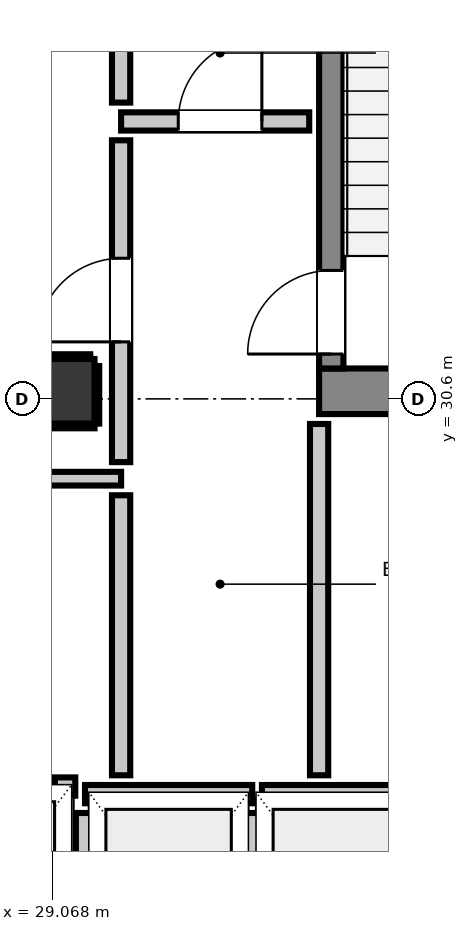
"""IFC4 building model, lengths in metres.
Left out: names, types, materials, properties, quantities, classifications, styles, units other than length and angle.
Written with IfcOpenShell. Run it as: python <this file> out.ifc"""

import sys

from ifc_helpers import new_model, si_unit, direction, frame, frame_2d, origin, origin_2d, place, context, subcontext, project, spatial, rectangle, extrude, element, fill, save


model = new_model("IFC4")
c1 = context("Model", 3, precision=1e-05, world=origin(), true_north=direction((0.0, 1.0)))
c2 = subcontext(c1, "Body", "Model", "MODEL_VIEW")
j1 = project(units=[si_unit("LENGTHUNIT", "METRE"), si_unit("PLANEANGLEUNIT", "RADIAN")], contexts=[c1])
p1 = place(None, origin())
s1 = spatial("IfcSite", under=j1, at=p1, CompositionType="ELEMENT")
p2 = place(p1, origin())
s2 = spatial("IfcBuilding", under=s1, at=p2, CompositionType="ELEMENT")
p3 = place(p2, frame((0.0, 0.0, 220.04)))
s3 = spatial("IfcBuildingStorey", under=s2, at=p3, CompositionType="ELEMENT", Elevation=220.04)
p4 = place(p3, frame((32.58, 30.7, 0.0), z_axis=(0.0, 0.0, 1.0), x_axis=(1.0, 0.0, 0.0)))
e1 = element("IfcWall", 1, at=p4, inside=s3, PredefinedType="SHEAR", context=c2, shape_type="SweptSolid", body=[
    extrude(rectangle(XDim=3.54, YDim=0.6, at=frame_2d((1.77, 0.0))), origin(), (0.0, 0.0, 1.0), 3.32),
])
p5 = place(p3, frame((32.74, 31.0, 0.0), z_axis=(0.0, 0.0, 1.0), x_axis=(0.0, 1.0, 0.0)))
e2 = element("IfcWall", 2, at=p5, inside=s3, PredefinedType="SHEAR", context=c2, shape_type="SweptSolid", body=[
    extrude(rectangle(XDim=7.8, YDim=0.32, at=frame_2d((3.9, 0.0))), origin(), (0.0, 0.0, 1.0), 3.32),
])
p6 = place(p5, frame((0.19, 0.0, 0.0)))
e3 = element("IfcOpeningElement", 3, at=p6, cuts=e2, PredefinedType="OPENING", context=c2, shape_type="SweptSolid", body=[
    extrude(rectangle(XDim=1.1, YDim=2.15, at=frame_2d((0.55, 1.075))), frame((0.0, 0.17, 0.0), z_axis=(0.0, -1.0, 0.0), x_axis=(1.0, 0.0, 0.0)), (0.0, 0.0, 1.0), 0.34),
])
p7 = place(p3, frame((29.2, 30.7, 0.0), z_axis=(0.0, 0.0, 1.0), x_axis=(1.0, 0.0, 0.0)))
e4 = element("IfcColumn", 4, at=p7, inside=s3, PredefinedType="COLUMN", context=c2, shape_type="SweptSolid", body=[
    extrude(rectangle(XDim=0.85, YDim=0.85, at=origin_2d()), origin(), (0.0, 0.0, 1.0), 3.32),
])
p8 = place(p3, frame((29.5, 25.4, 0.0), z_axis=(0.0, 0.0, 1.0), x_axis=(1.0, 0.0, 0.0)))
e5 = element("IfcWall", 5, at=p8, inside=s3, PredefinedType="PARTITIONING", context=c2, shape_type="SweptSolid", body=[
    extrude(rectangle(XDim=2.2, YDim=0.24, at=frame_2d((1.1, 0.0))), origin(), (0.0, 0.0, 1.0), 3.1),
])
p9 = place(p3, frame((29.5, 22.848, 0.0), z_axis=(0.0, 0.0, 1.0), x_axis=(0.0, 1.0, 0.0)))
e6 = element("IfcWall", 6, at=p9, inside=s3, PredefinedType="PARTITIONING", context=c2, shape_type="SweptSolid", body=[
    extrude(rectangle(XDim=2.304, YDim=0.24, at=frame_2d((1.152, 0.0))), origin(), (0.0, 0.0, 1.0), 2.335),
])
p10 = place(p3, frame((31.7, 22.848, 0.0), z_axis=(0.0, 0.0, 1.0), x_axis=(0.0, 1.0, 0.0)))
e7 = element("IfcWall", 7, at=p10, inside=s3, PredefinedType="PARTITIONING", context=c2, shape_type="SweptSolid", body=[
    extrude(rectangle(XDim=2.304, YDim=0.24, at=frame_2d((1.152, 0.0))), origin(), (0.0, 0.0, 1.0), 3.1),
])
p11 = place(p3, frame((31.828, 25.4, 0.0), z_axis=(0.0, 0.0, 1.0), x_axis=(1.0, 0.0, 0.0)))
e8 = element("IfcWall", 8, at=p11, inside=s3, PredefinedType="PARTITIONING", context=c2, shape_type="SweptSolid", body=[
    extrude(rectangle(XDim=2.072, YDim=0.24, at=frame_2d((1.036, 0.0))), origin(), (0.0, 0.0, 1.0), 3.1),
])
p12 = place(p3, frame((29.103, 25.5, 0.0), z_axis=(0.0, 0.0, 1.0), x_axis=(1.0, 0.0, 0.0)))
e9 = element("IfcWall", 9, at=p12, inside=s3, PredefinedType="PARTITIONING", context=c2, shape_type="SweptSolid", body=[
    extrude(rectangle(XDim=0.269, YDim=0.24, at=frame_2d((0.135, 0.0))), origin(), (0.0, 0.0, 1.0), 3.1),
])
p13 = place(p3, frame((29.975, 34.25, 0.0), z_axis=(0.0, 0.0, 1.0), x_axis=(1.0, 0.0, 0.0)))
e10 = element("IfcWall", 10, at=p13, inside=s3, PredefinedType="PARTITIONING", context=c2, shape_type="SweptSolid", body=[
    extrude(rectangle(XDim=2.475, YDim=0.24, at=frame_2d((1.237, 0.0))), origin(), (0.0, 0.0, 1.0), 3.1),
])
p14 = place(p13, frame((0.752, 0.0, 0.0)))
e11 = element("IfcOpeningElement", 11, at=p14, cuts=e10, PredefinedType="OPENING", context=c2, shape_type="SweptSolid", body=[
    extrude(rectangle(XDim=1.1, YDim=2.15, at=frame_2d((0.55, 1.075))), frame((0.0, 0.13, 0.0), z_axis=(0.0, -1.0, 0.0), x_axis=(1.0, 0.0, 0.0)), (0.0, 0.0, 1.0), 0.26),
])
p15 = place(p3, frame((28.593, 29.55, 0.0), z_axis=(0.0, 0.0, 1.0), x_axis=(1.0, 0.0, 0.0)))
e12 = element("IfcWall", 12, at=p15, inside=s3, PredefinedType="PARTITIONING", context=c2, shape_type="SweptSolid", body=[
    extrude(rectangle(XDim=1.382, YDim=0.18, at=frame_2d((0.691, 0.0))), origin(), (0.0, 0.0, 1.0), 3.1),
])
p16 = place(p3, frame((29.975, 25.648, 0.0), z_axis=(0.0, 0.0, 1.0), x_axis=(0.0, 1.0, 0.0)))
e13 = element("IfcWall", 13, at=p16, inside=s3, PredefinedType="PARTITIONING", context=c2, shape_type="SweptSolid", body=[
    extrude(rectangle(XDim=3.684, YDim=0.24, at=frame_2d((1.842, 0.0))), origin(), (0.0, 0.0, 1.0), 3.1),
])
p17 = place(p3, frame((29.975, 29.768, 0.0), z_axis=(0.0, 0.0, 1.0), x_axis=(0.0, 1.0, 0.0)))
e14 = element("IfcWall", 14, at=p17, inside=s3, PredefinedType="PARTITIONING", context=c2, shape_type="SweptSolid", body=[
    extrude(rectangle(XDim=4.234, YDim=0.24, at=frame_2d((2.117, 0.0))), origin(), (0.0, 0.0, 1.0), 3.1),
])
p18 = place(p17, frame((1.582, 0.0, 0.0)))
e15 = element("IfcOpeningElement", 15, at=p18, cuts=e14, PredefinedType="OPENING", context=c2, shape_type="SweptSolid", body=[
    extrude(rectangle(XDim=1.1, YDim=2.15, at=frame_2d((0.55, 1.075))), frame((0.0, 0.13, 0.0), z_axis=(0.0, -1.0, 0.0), x_axis=(1.0, 0.0, 0.0)), (0.0, 0.0, 1.0), 0.26),
])
p19 = place(p3, frame((29.975, 34.498, 0.0), z_axis=(0.0, 0.0, 1.0), x_axis=(0.0, 1.0, 0.0)))
e16 = element("IfcWall", 16, at=p19, inside=s3, PredefinedType="PARTITIONING", context=c2, shape_type="SweptSolid", body=[
    extrude(rectangle(XDim=0.934, YDim=0.24, at=frame_2d((0.467, 0.0))), origin(), (0.0, 0.0, 1.0), 3.1),
])
p20 = place(p3, frame((32.58, 25.648, 0.0), z_axis=(0.0, 0.0, 1.0), x_axis=(0.0, 1.0, 0.0)))
e17 = element("IfcWall", 17, at=p20, inside=s3, PredefinedType="PARTITIONING", context=c2, shape_type="SweptSolid", body=[
    extrude(rectangle(XDim=4.622, YDim=0.24, at=frame_2d((2.311, 0.0))), origin(), (0.0, 0.0, 1.0), 3.1),
])
p21 = place(p3, frame((28.775, 30.243, 0.0), z_axis=(0.0, 0.0, 1.0), x_axis=(1.0, 0.0, 0.0)))
e18 = element("IfcWall", 18, at=p21, inside=s3, PredefinedType="PARTITIONING", context=c2, shape_type="SweptSolid", body=[
    extrude(rectangle(XDim=0.85, YDim=0.06, at=frame_2d((0.425, 0.0))), origin(), (0.0, 0.0, 1.0), 1.45),
])
p22 = place(p3, frame((28.775, 31.157, 0.0), z_axis=(0.0, 0.0, 1.0), x_axis=(1.0, 0.0, 0.0)))
e19 = element("IfcWall", 19, at=p22, inside=s3, PredefinedType="PARTITIONING", context=c2, shape_type="SweptSolid", body=[
    extrude(rectangle(XDim=0.794, YDim=0.06, at=frame_2d((0.397, 0.0))), origin(), (0.0, 0.0, 1.0), 1.45),
])
p23 = place(p3, frame((29.657, 30.275, 0.0), z_axis=(0.0, 0.0, 1.0), x_axis=(0.0, 1.0, 0.0)))
e20 = element("IfcWall", 20, at=p23, inside=s3, PredefinedType="PARTITIONING", context=c2, shape_type="SweptSolid", body=[
    extrude(rectangle(XDim=0.757, YDim=0.06, at=frame_2d((0.378, 0.0))), origin(), (0.0, 0.0, 1.0), 1.45),
])
p24 = place(p6, origin())
e21 = element("IfcDoor", 21, at=p24, inside=s3, OperationType="SINGLE_SWING_LEFT", PredefinedType="DOOR", context=c2, shape_type="SweptSolid", body=[
    extrude(rectangle(XDim=1.1, YDim=2.15, at=frame_2d((0.55, 1.075))), frame((0.0, 0.025, 0.0), z_axis=(0.0, -1.0, 0.0), x_axis=(1.0, 0.0, 0.0)), (0.0, 0.0, 1.0), 0.05),
])
fill(e3, e21)
p25 = place(p18, origin())
e22 = element("IfcDoor", 22, at=p25, inside=s3, OperationType="SINGLE_SWING_LEFT", PredefinedType="DOOR", context=c2, shape_type="SweptSolid", body=[
    extrude(rectangle(XDim=1.1, YDim=2.15, at=frame_2d((0.55, 1.075))), frame((0.0, 0.025, 0.0), z_axis=(0.0, -1.0, 0.0), x_axis=(1.0, 0.0, 0.0)), (0.0, 0.0, 1.0), 0.05),
])
fill(e15, e22)
p26 = place(p14, origin())
e23 = element("IfcDoor", 23, at=p26, inside=s3, OperationType="SINGLE_SWING_RIGHT", PredefinedType="DOOR", context=c2, shape_type="SweptSolid", body=[
    extrude(rectangle(XDim=1.1, YDim=2.15, at=frame_2d((0.55, 1.075))), frame((0.0, 0.025, 0.0), z_axis=(0.0, -1.0, 0.0), x_axis=(1.0, 0.0, 0.0)), (0.0, 0.0, 1.0), 0.05),
])
fill(e11, e23)
save(model, sys.argv[1])
